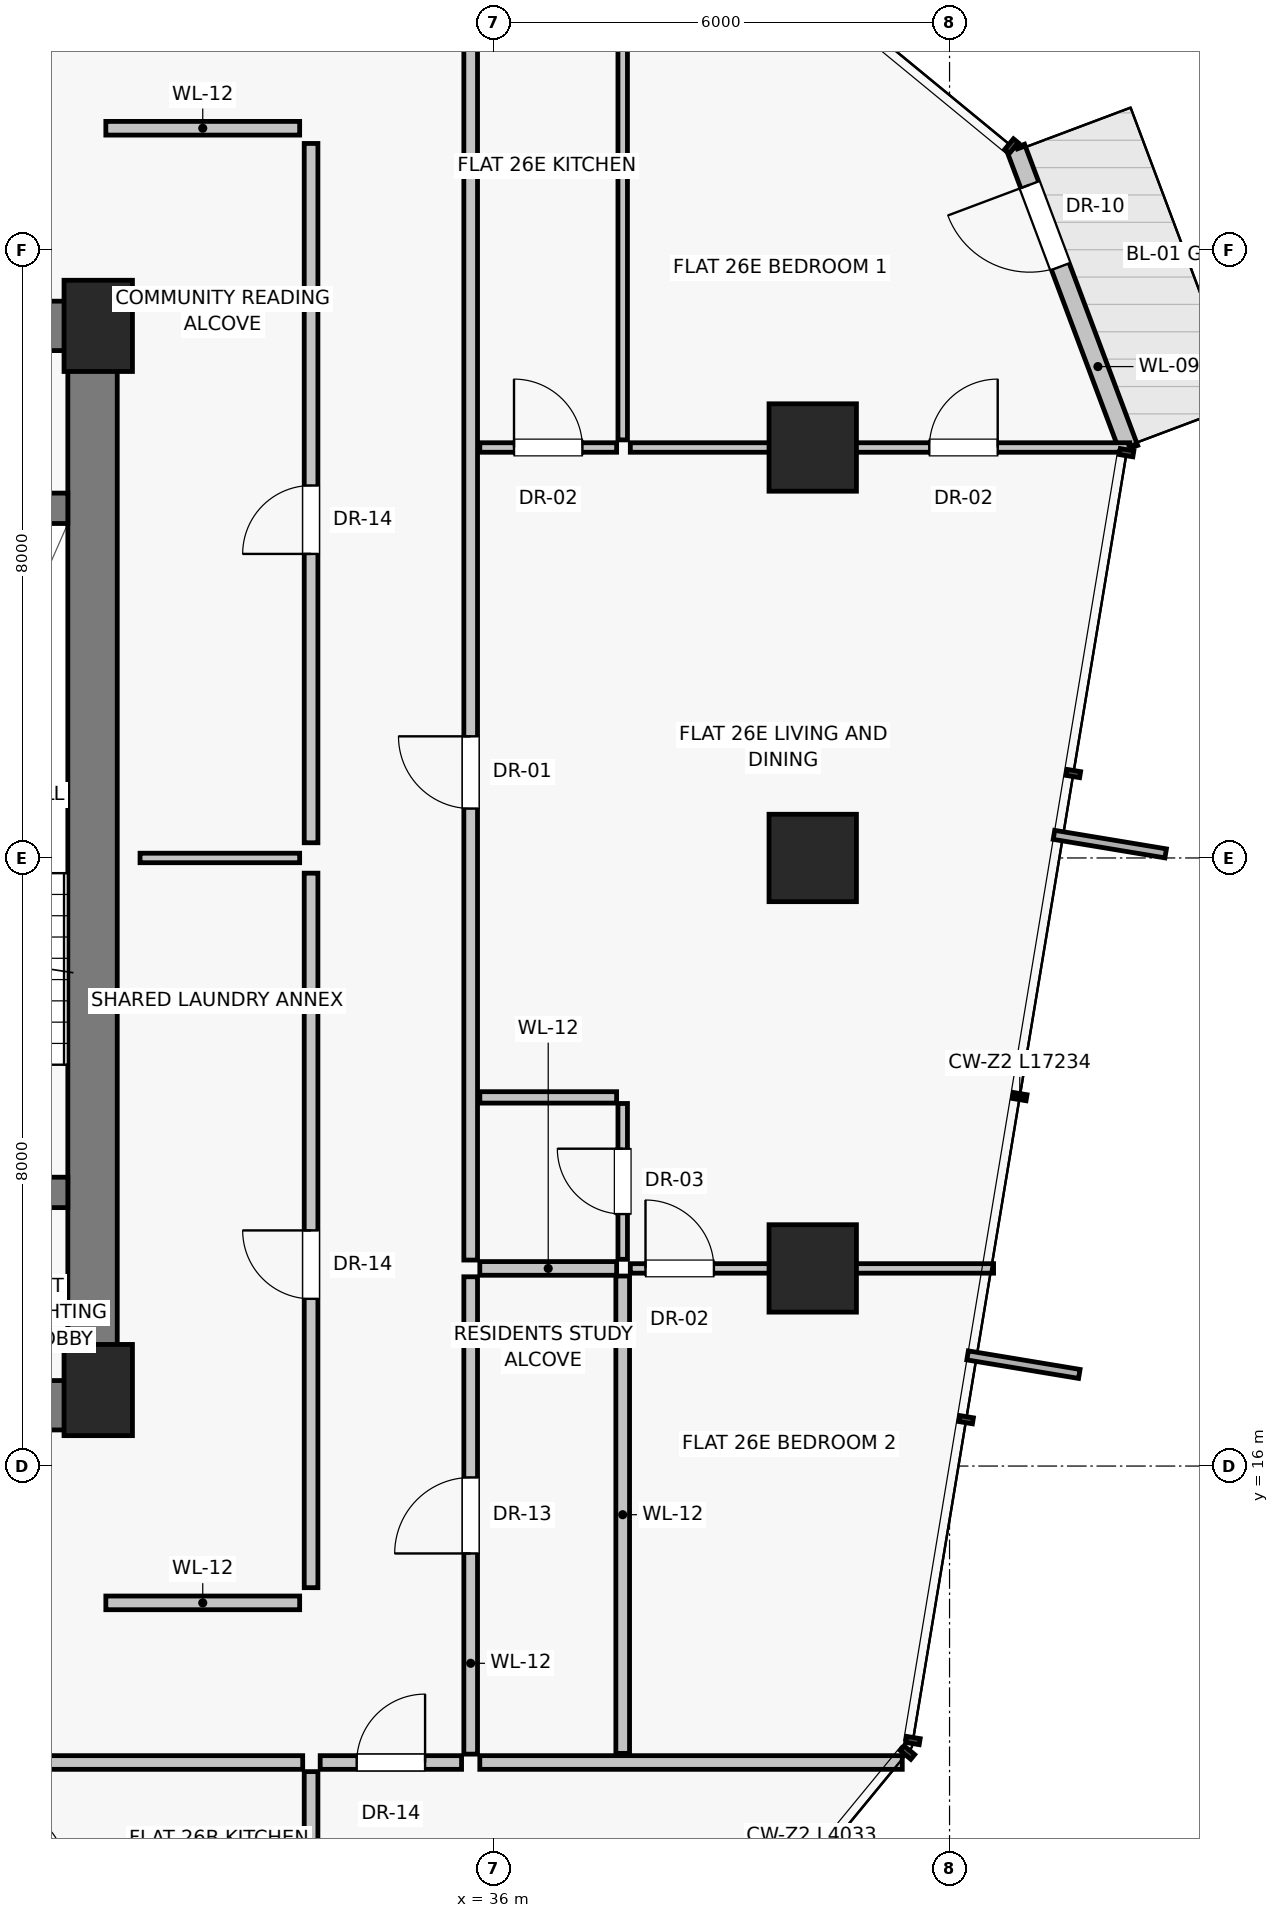
"""IFC4 building model, lengths in metres.
Left out: names, types, materials, properties, quantities, classifications, styles, units other than length and angle.
Written with IfcOpenShell. Run it as: python <this file> out.ifc"""

import sys

from ifc_helpers import new_model, si_unit, direction, frame, frame_2d, origin, origin_2d, place, context, subcontext, project, spatial, rectangle, extrude, source, transform, mapped, element, fill, save


model = new_model("IFC4")
c1 = context("Model", 3, precision=1e-05, world=origin(), true_north=direction((0.0, 1.0)))
c2 = subcontext(c1, "Body", "Model", "MODEL_VIEW")
j1 = project(units=[si_unit("LENGTHUNIT", "METRE"), si_unit("PLANEANGLEUNIT", "RADIAN")], contexts=[c1])
p1 = place(None, origin())
s1 = spatial("IfcSite", under=j1, at=p1, CompositionType="ELEMENT")
p2 = place(p1, origin())
s2 = spatial("IfcBuilding", under=s1, at=p2, CompositionType="ELEMENT")
p3 = place(p2, frame((0.0, 0.0, 95.95)))
s3 = spatial("IfcBuildingStorey", under=s2, at=p3, CompositionType="ELEMENT", Elevation=95.95)
for number, where, z_axis, x_axis in (
    (1, (30.8, 17.0, 0.0), (0.0, 0.0, 1.0), (1.0, 0.0, 0.0)),
    (2, (30.8, 31.0, 0.0), (0.0, 0.0, 1.0), (1.0, 0.0, 0.0)),
):
    element("IfcColumn", number, at=place(p3, frame(where, z_axis=z_axis, x_axis=x_axis)), inside=s3, PredefinedType="PILASTER", context=c2, shape_type="SweptSolid", body=[
        extrude(rectangle(XDim=0.9, YDim=1.2, at=origin_2d()), origin(), (0.0, 0.0, 1.0), 3.25),
    ])
for number, where, z_axis, x_axis in (
    (3, (40.2, 18.6, 0.0), (0.0, 0.0, 1.0), (1.0, 0.0, 0.0)),
    (4, (40.2, 24.0, 0.0), (0.0, 0.0, 1.0), (1.0, 0.0, 0.0)),
    (5, (40.2, 29.4, 0.0), (0.0, 0.0, 1.0), (1.0, 0.0, 0.0)),
):
    element("IfcColumn", number, at=place(p3, frame(where, z_axis=z_axis, x_axis=x_axis)), inside=s3, PredefinedType="COLUMN", context=c2, shape_type="SweptSolid", body=[
        extrude(rectangle(XDim=1.15, YDim=1.15, at=origin_2d()), origin(), (0.0, 0.0, 1.0), 3.25),
    ])
p4 = place(p3, frame((44.358, 29.383, 0.0), z_axis=(0.0, 0.0, 1.0), x_axis=(-0.351527922506, 0.936177397558, 0.0)))
e6 = element("IfcWall", 6, at=p4, inside=s3, PredefinedType="SOLIDWALL", context=c2, shape_type="SweptSolid", body=[
    extrude(rectangle(XDim=4.233, YDim=0.25, at=frame_2d((2.117, 0.0))), origin(), (0.0, 0.0, 1.0), 3.0),
])
p5 = place(p4, frame((2.56, 0.0, 0.0)))
e7 = element("IfcOpeningElement", 7, at=p5, cuts=e6, PredefinedType="OPENING", context=c2, shape_type="SweptSolid", body=[
    extrude(rectangle(XDim=1.15, YDim=2.25, at=frame_2d((0.575, 1.125))), frame((0.0, 0.135, 0.0), z_axis=(0.0, -1.0, 0.0), x_axis=(1.0, 0.0, 0.0)), (0.0, 0.0, 1.0), 0.27),
])
p6 = place(p3, frame((30.725, 16.8, 0.0), z_axis=(0.0, 0.0, 1.0), x_axis=(0.0, 1.0, 0.0)))
e8 = element("IfcWall", 8, at=p6, inside=s3, PredefinedType="SHEAR", context=c2, shape_type="SweptSolid", body=[
    extrude(rectangle(XDim=14.2, YDim=0.65, at=frame_2d((7.1, 0.0))), origin(), (0.0, 0.0, 1.0), 3.0),
])
p7 = place(p3, frame((24.95, 16.8, 0.0), z_axis=(0.0, 0.0, 1.0), x_axis=(1.0, 0.0, 0.0)))
e9 = element("IfcWall", 9, at=p7, inside=s3, PredefinedType="SHEAR", context=c2, shape_type="SweptSolid", body=[
    extrude(rectangle(XDim=5.85, YDim=0.65, at=frame_2d((2.925, 0.0))), origin(), (0.0, 0.0, 1.0), 3.0),
])
p8 = place(p7, frame((2.15, 0.0, 0.0)))
e10 = element("IfcOpeningElement", 10, at=p8, cuts=e9, PredefinedType="OPENING", context=c2, shape_type="SweptSolid", body=[
    extrude(rectangle(XDim=1.2, YDim=2.03, at=frame_2d((0.6, 1.015))), frame((0.0, 0.335, 0.0), z_axis=(0.0, -1.0, 0.0), x_axis=(1.0, 0.0, 0.0)), (0.0, 0.0, 1.0), 0.67),
])
p9 = place(p3, frame((27.0, 31.0, 0.0), z_axis=(0.0, 0.0, 1.0), x_axis=(1.0, 0.0, 0.0)))
e11 = element("IfcWall", 11, at=p9, inside=s3, PredefinedType="SHEAR", context=c2, shape_type="SweptSolid", body=[
    extrude(rectangle(XDim=3.8, YDim=0.65, at=frame_2d((1.9, 0.0))), origin(), (0.0, 0.0, 1.0), 3.0),
])
p10 = place(p9, frame((0.45, 0.0, 0.0)))
e12 = element("IfcOpeningElement", 12, at=p10, cuts=e11, PredefinedType="OPENING", context=c2, shape_type="SweptSolid", body=[
    extrude(rectangle(XDim=0.86, YDim=2.01, at=frame_2d((0.43, 1.005))), frame((0.0, 0.335, 0.0), z_axis=(0.0, -1.0, 0.0), x_axis=(1.0, 0.0, 0.0)), (0.0, 0.0, 1.0), 0.67),
])
p11 = place(p9, frame((1.9, 0.0, 0.0)))
e13 = element("IfcOpeningElement", 13, at=p11, cuts=e11, PredefinedType="OPENING", context=c2, shape_type="SweptSolid", body=[
    extrude(rectangle(XDim=0.86, YDim=2.01, at=frame_2d((0.43, 1.005))), frame((0.0, 0.335, 0.0), z_axis=(0.0, -1.0, 0.0), x_axis=(1.0, 0.0, 0.0)), (0.0, 0.0, 1.0), 0.67),
])
p12 = place(p3, frame((27.0, 19.6, 0.0), z_axis=(0.0, 0.0, 1.0), x_axis=(1.0, 0.0, 0.0)))
e14 = element("IfcWall", 14, at=p12, inside=s3, PredefinedType="SHEAR", context=c2, shape_type="SweptSolid", body=[
    extrude(rectangle(XDim=3.4, YDim=0.4, at=frame_2d((1.7, 0.0))), origin(), (0.0, 0.0, 1.0), 3.0),
])
p13 = place(p12, frame((1.05, 0.0, 0.0)))
e15 = element("IfcOpeningElement", 15, at=p13, cuts=e14, PredefinedType="OPENING", context=c2, shape_type="SweptSolid", body=[
    extrude(rectangle(XDim=1.1, YDim=2.03, at=frame_2d((0.55, 1.015))), frame((0.0, 0.21, 0.0), z_axis=(0.0, -1.0, 0.0), x_axis=(1.0, 0.0, 0.0)), (0.0, 0.0, 1.0), 0.42),
])
p14 = place(p3, frame((27.0, 28.6, 0.0), z_axis=(0.0, 0.0, 1.0), x_axis=(1.0, 0.0, 0.0)))
e16 = element("IfcWall", 16, at=p14, inside=s3, PredefinedType="SHEAR", context=c2, shape_type="SweptSolid", body=[
    extrude(rectangle(XDim=3.4, YDim=0.4, at=frame_2d((1.7, 0.0))), origin(), (0.0, 0.0, 1.0), 3.0),
])
p15 = place(p3, frame((33.6, 14.4, 0.0), z_axis=(0.0, 0.0, 1.0), x_axis=(0.0, 1.0, 0.0)))
e17 = element("IfcWall", 17, at=p15, inside=s3, PredefinedType="PARTITIONING", context=c2, shape_type="SweptSolid", body=[
    extrude(rectangle(XDim=9.4, YDim=0.18, at=frame_2d((4.7, 0.0))), origin(), (0.0, 0.0, 1.0), 3.0),
])
p16 = place(p15, frame((3.8, 0.0, 0.0)))
e18 = element("IfcOpeningElement", 18, at=p16, cuts=e17, PredefinedType="OPENING", context=c2, shape_type="SweptSolid", body=[
    extrude(rectangle(XDim=0.9, YDim=2.01, at=frame_2d((0.45, 1.005))), frame((0.0, 0.1, 0.0), z_axis=(0.0, -1.0, 0.0), x_axis=(1.0, 0.0, 0.0)), (0.0, 0.0, 1.0), 0.2),
])
p17 = place(p3, frame((33.6, 24.2, 0.0), z_axis=(0.0, 0.0, 1.0), x_axis=(0.0, 1.0, 0.0)))
e19 = element("IfcWall", 19, at=p17, inside=s3, PredefinedType="PARTITIONING", context=c2, shape_type="SweptSolid", body=[
    extrude(rectangle(XDim=9.2, YDim=0.18, at=frame_2d((4.6, 0.0))), origin(), (0.0, 0.0, 1.0), 3.0),
])
p18 = place(p17, frame((3.8, 0.0, 0.0)))
e20 = element("IfcOpeningElement", 20, at=p18, cuts=e19, PredefinedType="OPENING", context=c2, shape_type="SweptSolid", body=[
    extrude(rectangle(XDim=0.9, YDim=2.01, at=frame_2d((0.45, 1.005))), frame((0.0, 0.1, 0.0), z_axis=(0.0, -1.0, 0.0), x_axis=(1.0, 0.0, 0.0)), (0.0, 0.0, 1.0), 0.2),
])
p19 = place(p3, frame((31.35, 24.0, 0.0), z_axis=(0.0, 0.0, 1.0), x_axis=(1.0, 0.0, 0.0)))
e21 = element("IfcWall", 21, at=p19, inside=s3, PredefinedType="PARTITIONING", context=c2, shape_type="SweptSolid", body=[
    extrude(rectangle(XDim=2.1, YDim=0.125, at=frame_2d((1.05, 0.0))), origin(), (0.0, 0.0, 1.0), 3.0),
])
for number, where, z_axis, x_axis in (
    (22, (30.9, 14.2, 0.0), (0.0, 0.0, 1.0), (1.0, 0.0, 0.0)),
    (23, (30.9, 33.6, 0.0), (0.0, 0.0, 1.0), (1.0, 0.0, 0.0)),
):
    element("IfcWall", number, at=place(p3, frame(where, z_axis=z_axis, x_axis=x_axis)), inside=s3, PredefinedType="PARTITIONING", context=c2, shape_type="SweptSolid", body=[
        extrude(rectangle(XDim=2.55, YDim=0.18, at=frame_2d((1.275, 0.0))), origin(), (0.0, 0.0, 1.0), 3.0),
    ])
p20 = place(p3, frame((33.6, 11.98, 0.0), z_axis=(0.0, 0.0, 1.0), x_axis=(0.0, -1.0, 0.0)))
e24 = element("IfcWall", 24, at=p20, inside=s3, PredefinedType="PARTITIONING", context=c2, shape_type="SweptSolid", body=[
    extrude(rectangle(XDim=4.897, YDim=0.18, at=frame_2d((2.449, 0.0))), origin(), (0.0, 0.0, 1.0), 3.0),
])
p21 = place(p3, frame((24.754, 12.1, 0.0), z_axis=(0.0, 0.0, 1.0), x_axis=(1.0, 0.0, 0.0)))
e25 = element("IfcWall", 25, at=p21, inside=s3, PredefinedType="PARTITIONING", context=c2, shape_type="SweptSolid", body=[
    extrude(rectangle(XDim=8.736, YDim=0.18, at=frame_2d((4.368, 0.0))), origin(), (0.0, 0.0, 1.0), 2.58),
])
p22 = place(p21, frame((2.958, 0.0, 0.0)))
e26 = element("IfcOpeningElement", 26, at=p22, cuts=e25, PredefinedType="OPENING", context=c2, shape_type="SweptSolid", body=[
    extrude(rectangle(XDim=0.95, YDim=2.02, at=frame_2d((0.475, 1.01))), frame((0.0, 0.1, 0.0), z_axis=(0.0, -1.0, 0.0), x_axis=(1.0, 0.0, 0.0)), (0.0, 0.0, 1.0), 0.2),
])
p23 = place(p3, frame((35.82, 12.1, 0.0), z_axis=(0.0, 0.0, 1.0), x_axis=(1.0, 0.0, 0.0)))
e27 = element("IfcWall", 27, at=p23, inside=s3, PredefinedType="PARTITIONING", context=c2, shape_type="SweptSolid", body=[
    extrude(rectangle(XDim=5.558, YDim=0.18, at=frame_2d((2.779, 0.0))), origin(), (0.0, 0.0, 1.0), 3.0),
])
p24 = place(p3, frame((35.7, 12.21, 0.0), z_axis=(0.0, 0.0, 1.0), x_axis=(0.0, 1.0, 0.0)))
e28 = element("IfcWall", 28, at=p24, inside=s3, PredefinedType="PARTITIONING", context=c2, shape_type="SweptSolid", body=[
    extrude(rectangle(XDim=6.28, YDim=0.18, at=frame_2d((3.14, 0.0))), origin(), (0.0, 0.0, 1.0), 2.58),
])
p25 = place(p24, frame((2.64, 0.0, 0.0)))
e29 = element("IfcOpeningElement", 29, at=p25, cuts=e28, PredefinedType="OPENING", context=c2, shape_type="SweptSolid", body=[
    extrude(rectangle(XDim=1.0, YDim=2.01, at=frame_2d((0.5, 1.005))), frame((0.0, 0.1, 0.0), z_axis=(0.0, -1.0, 0.0), x_axis=(1.0, 0.0, 0.0)), (0.0, 0.0, 1.0), 0.2),
])
p26 = place(p3, frame((35.7, 18.71, 0.0), z_axis=(0.0, 0.0, 1.0), x_axis=(0.0, 1.0, 0.0)))
e30 = element("IfcWall", 30, at=p26, inside=s3, PredefinedType="PARTITIONING", context=c2, shape_type="SweptSolid", body=[
    extrude(rectangle(XDim=16.88, YDim=0.18, at=frame_2d((8.44, 0.0))), origin(), (0.0, 0.0, 1.0), 2.58),
])
p27 = place(p26, frame((5.94, 0.0, 0.0)))
e31 = element("IfcOpeningElement", 31, at=p27, cuts=e30, PredefinedType="OPENING", context=c2, shape_type="SweptSolid", body=[
    extrude(rectangle(XDim=0.95, YDim=2.02, at=frame_2d((0.475, 1.01))), frame((0.0, 0.1, 0.0), z_axis=(0.0, -1.0, 0.0), x_axis=(1.0, 0.0, 0.0)), (0.0, 0.0, 1.0), 0.2),
])
p28 = place(p3, frame((37.7, 12.22, 0.0), z_axis=(0.0, 0.0, 1.0), x_axis=(0.0, 1.0, 0.0)))
e32 = element("IfcWall", 32, at=p28, inside=s3, PredefinedType="PARTITIONING", context=c2, shape_type="SweptSolid", body=[
    extrude(rectangle(XDim=6.28, YDim=0.18, at=frame_2d((3.14, 0.0))), origin(), (0.0, 0.0, 1.0), 3.0),
])
p29 = place(p3, frame((35.82, 18.6, 0.0), z_axis=(0.0, 0.0, 1.0), x_axis=(1.0, 0.0, 0.0)))
e33 = element("IfcWall", 33, at=p29, inside=s3, PredefinedType="PARTITIONING", context=c2, shape_type="SweptSolid", body=[
    extrude(rectangle(XDim=1.8, YDim=0.18, at=frame_2d((0.9, 0.0))), origin(), (0.0, 0.0, 1.0), 2.378),
])
p30 = place(p3, frame((37.8, 18.6, 0.0), z_axis=(0.0, 0.0, 1.0), x_axis=(1.0, 0.0, 0.0)))
e34 = element("IfcWall", 34, at=p30, inside=s3, PredefinedType="PARTITIONING", context=c2, shape_type="SweptSolid", body=[
    extrude(rectangle(XDim=4.779, YDim=0.125, at=frame_2d((2.39, 0.0))), origin(), (0.0, 0.0, 1.0), 2.378),
])
p31 = place(p30, frame((0.2, 0.0, 0.0)))
e35 = element("IfcOpeningElement", 35, at=p31, cuts=e34, PredefinedType="OPENING", context=c2, shape_type="SweptSolid", body=[
    extrude(rectangle(XDim=0.9, YDim=2.01, at=frame_2d((0.45, 1.005))), frame((0.0, 0.073, 0.0), z_axis=(0.0, -1.0, 0.0), x_axis=(1.0, 0.0, 0.0)), (0.0, 0.0, 1.0), 0.145),
])
p32 = place(p3, frame((35.82, 20.85, 0.0), z_axis=(0.0, 0.0, 1.0), x_axis=(1.0, 0.0, 0.0)))
e36 = element("IfcWall", 36, at=p32, inside=s3, PredefinedType="PARTITIONING", context=c2, shape_type="SweptSolid", body=[
    extrude(rectangle(XDim=1.8, YDim=0.15, at=frame_2d((0.9, 0.0))), origin(), (0.0, 0.0, 1.0), 3.0),
])
p33 = place(p3, frame((37.7, 18.72, 0.0), z_axis=(0.0, 0.0, 1.0), x_axis=(0.0, 1.0, 0.0)))
e37 = element("IfcWall", 37, at=p33, inside=s3, PredefinedType="PARTITIONING", context=c2, shape_type="SweptSolid", body=[
    extrude(rectangle(XDim=2.05, YDim=0.125, at=frame_2d((1.025, 0.0))), origin(), (0.0, 0.0, 1.0), 3.0),
])
p34 = place(p33, frame((0.595, 0.0, 0.0)))
e38 = element("IfcOpeningElement", 38, at=p34, cuts=e37, PredefinedType="OPENING", context=c2, shape_type="SweptSolid", body=[
    extrude(rectangle(XDim=0.86, YDim=2.01, at=frame_2d((0.43, 1.005))), frame((0.0, 0.073, 0.0), z_axis=(0.0, -1.0, 0.0), x_axis=(1.0, 0.0, 0.0)), (0.0, 0.0, 1.0), 0.145),
])
p35 = place(p3, frame((35.82, 29.4, 0.0), z_axis=(0.0, 0.0, 1.0), x_axis=(1.0, 0.0, 0.0)))
e39 = element("IfcWall", 39, at=p35, inside=s3, PredefinedType="PARTITIONING", context=c2, shape_type="SweptSolid", body=[
    extrude(rectangle(XDim=1.8, YDim=0.125, at=frame_2d((0.9, 0.0))), origin(), (0.0, 0.0, 1.0), 2.378),
])
p36 = place(p35, frame((0.45, 0.0, 0.0)))
e40 = element("IfcOpeningElement", 40, at=p36, cuts=e39, PredefinedType="OPENING", context=c2, shape_type="SweptSolid", body=[
    extrude(rectangle(XDim=0.9, YDim=2.01, at=frame_2d((0.45, 1.005))), frame((0.0, 0.073, 0.0), z_axis=(0.0, -1.0, 0.0), x_axis=(1.0, 0.0, 0.0)), (0.0, 0.0, 1.0), 0.145),
])
p37 = place(p3, frame((37.7, 29.5, 0.0), z_axis=(0.0, 0.0, 1.0), x_axis=(0.0, 1.0, 0.0)))
e41 = element("IfcWall", 41, at=p37, inside=s3, PredefinedType="PARTITIONING", context=c2, shape_type="SweptSolid", body=[
    extrude(rectangle(XDim=6.08, YDim=0.125, at=frame_2d((3.04, 0.0))), origin(), (0.0, 0.0, 1.0), 3.0),
])
p38 = place(p3, frame((37.8, 29.4, 0.0), z_axis=(0.0, 0.0, 1.0), x_axis=(1.0, 0.0, 0.0)))
e42 = element("IfcWall", 42, at=p38, inside=s3, PredefinedType="PARTITIONING", context=c2, shape_type="SweptSolid", body=[
    extrude(rectangle(XDim=6.571, YDim=0.125, at=frame_2d((3.286, 0.0))), origin(), (0.0, 0.0, 1.0), 2.378),
])
p39 = place(p38, frame((3.934, 0.0, 0.0)))
e43 = element("IfcOpeningElement", 43, at=p39, cuts=e42, PredefinedType="OPENING", context=c2, shape_type="SweptSolid", body=[
    extrude(rectangle(XDim=0.9, YDim=2.01, at=frame_2d((0.45, 1.005))), frame((0.0, 0.073, 0.0), z_axis=(0.0, -1.0, 0.0), x_axis=(1.0, 0.0, 0.0)), (0.0, 0.0, 1.0), 0.145),
])
p40 = place(p3, frame((33.72, 12.1, 0.0), z_axis=(0.0, 0.0, 1.0), x_axis=(1.0, 0.0, 0.0)))
e44 = element("IfcWall", 44, at=p40, inside=s3, PredefinedType="PARTITIONING", context=c2, shape_type="SweptSolid", body=[
    extrude(rectangle(XDim=1.86, YDim=0.18, at=frame_2d((0.93, 0.0))), origin(), (0.0, 0.0, 1.0), 3.0),
])
p41 = place(p40, frame((0.48, 0.0, 0.0)))
e45 = element("IfcOpeningElement", 45, at=p41, cuts=e44, PredefinedType="OPENING", context=c2, shape_type="SweptSolid", body=[
    extrude(rectangle(XDim=0.9, YDim=2.01, at=frame_2d((0.45, 1.005))), frame((0.0, 0.1, 0.0), z_axis=(0.0, -1.0, 0.0), x_axis=(1.0, 0.0, 0.0)), (0.0, 0.0, 1.0), 0.2),
])
m1 = source(origin(), c2, "Body", "SweptSolid", [
    extrude(rectangle(XDim=1.15, YDim=2.25, at=frame_2d((0.575, 1.125))), frame((0.0, 0.025, 0.0), z_axis=(0.0, -1.0, 0.0), x_axis=(1.0, 0.0, 0.0)), (0.0, 0.0, 1.0), 0.05),
])
p42 = place(p5, frame((1.15, 0.0, 0.0), z_axis=(0.0, 0.0, 1.0), x_axis=(-1.0, 0.0, 0.0)))
e46 = element("IfcDoor", 46, at=p42, inside=s3, OperationType="SINGLE_SWING_RIGHT", PredefinedType="DOOR", context=c2, shape_type="MappedRepresentation", body=[
    mapped(m1, transform((0.0, 0.0, 0.0), scale=1.0)),
])
fill(e7, e46)
m2 = source(origin(), c2, "Body", "SweptSolid", [
    extrude(rectangle(XDim=0.9, YDim=2.01, at=frame_2d((0.45, 1.005))), frame((0.0, 0.025, 0.0), z_axis=(0.0, -1.0, 0.0), x_axis=(1.0, 0.0, 0.0)), (0.0, 0.0, 1.0), 0.05),
])
p43 = place(p16, origin())
e47 = element("IfcDoor", 47, at=p43, inside=s3, OperationType="SINGLE_SWING_RIGHT", PredefinedType="DOOR", context=c2, shape_type="MappedRepresentation", body=[
    mapped(m2, transform((0.0, 0.0, 0.0), scale=1.0)),
])
fill(e18, e47)
p44 = place(p18, origin())
e48 = element("IfcDoor", 48, at=p44, inside=s3, OperationType="SINGLE_SWING_LEFT", PredefinedType="DOOR", context=c2, shape_type="MappedRepresentation", body=[
    mapped(m2, transform((0.0, 0.0, 0.0), scale=1.0)),
])
fill(e20, e48)
m3 = source(origin(), c2, "Body", "SweptSolid", [
    extrude(rectangle(XDim=1.0, YDim=2.01, at=frame_2d((0.5, 1.005))), frame((0.0, 0.025, 0.0), z_axis=(0.0, -1.0, 0.0), x_axis=(1.0, 0.0, 0.0)), (0.0, 0.0, 1.0), 0.05),
])
p45 = place(p25, origin())
e49 = element("IfcDoor", 49, at=p45, inside=s3, OperationType="SINGLE_SWING_LEFT", PredefinedType="DOOR", context=c2, shape_type="MappedRepresentation", body=[
    mapped(m3, transform((0.0, 0.0, 0.0), scale=1.0)),
])
fill(e29, e49)
m4 = source(origin(), c2, "Body", "SweptSolid", [
    extrude(rectangle(XDim=0.95, YDim=2.02, at=frame_2d((0.475, 1.01))), frame((0.0, 0.025, 0.0), z_axis=(0.0, -1.0, 0.0), x_axis=(1.0, 0.0, 0.0)), (0.0, 0.0, 1.0), 0.05),
])
p46 = place(p27, origin())
e50 = element("IfcDoor", 50, at=p46, inside=s3, OperationType="SINGLE_SWING_RIGHT", PredefinedType="DOOR", context=c2, shape_type="MappedRepresentation", body=[
    mapped(m4, transform((0.0, 0.0, 0.0), scale=1.0)),
])
fill(e31, e50)
p47 = place(p31, origin())
e51 = element("IfcDoor", 51, at=p47, inside=s3, OperationType="SINGLE_SWING_LEFT", PredefinedType="DOOR", context=c2, shape_type="MappedRepresentation", body=[
    mapped(m2, transform((0.0, 0.0, 0.0), scale=1.0)),
])
fill(e35, e51)
m5 = source(origin(), c2, "Body", "SweptSolid", [
    extrude(rectangle(XDim=0.86, YDim=2.01, at=frame_2d((0.43, 1.005))), frame((0.0, 0.025, 0.0), z_axis=(0.0, -1.0, 0.0), x_axis=(1.0, 0.0, 0.0)), (0.0, 0.0, 1.0), 0.05),
])
p48 = place(p34, origin())
e52 = element("IfcDoor", 52, at=p48, inside=s3, OperationType="SINGLE_SWING_RIGHT", PredefinedType="DOOR", context=c2, shape_type="MappedRepresentation", body=[
    mapped(m5, transform((0.0, 0.0, 0.0), scale=1.0)),
])
fill(e38, e52)
p49 = place(p36, origin())
e53 = element("IfcDoor", 53, at=p49, inside=s3, OperationType="SINGLE_SWING_LEFT", PredefinedType="DOOR", context=c2, shape_type="MappedRepresentation", body=[
    mapped(m2, transform((0.0, 0.0, 0.0), scale=1.0)),
])
fill(e40, e53)
p50 = place(p39, origin())
e54 = element("IfcDoor", 54, at=p50, inside=s3, OperationType="SINGLE_SWING_RIGHT", PredefinedType="DOOR", context=c2, shape_type="MappedRepresentation", body=[
    mapped(m2, transform((0.0, 0.0, 0.0), scale=1.0)),
])
fill(e43, e54)
p51 = place(p41, origin())
e55 = element("IfcDoor", 55, at=p51, inside=s3, OperationType="SINGLE_SWING_RIGHT", PredefinedType="DOOR", context=c2, shape_type="MappedRepresentation", body=[
    mapped(m2, transform((0.0, 0.0, 0.0), scale=1.0)),
])
fill(e45, e55)
save(model, sys.argv[1])
